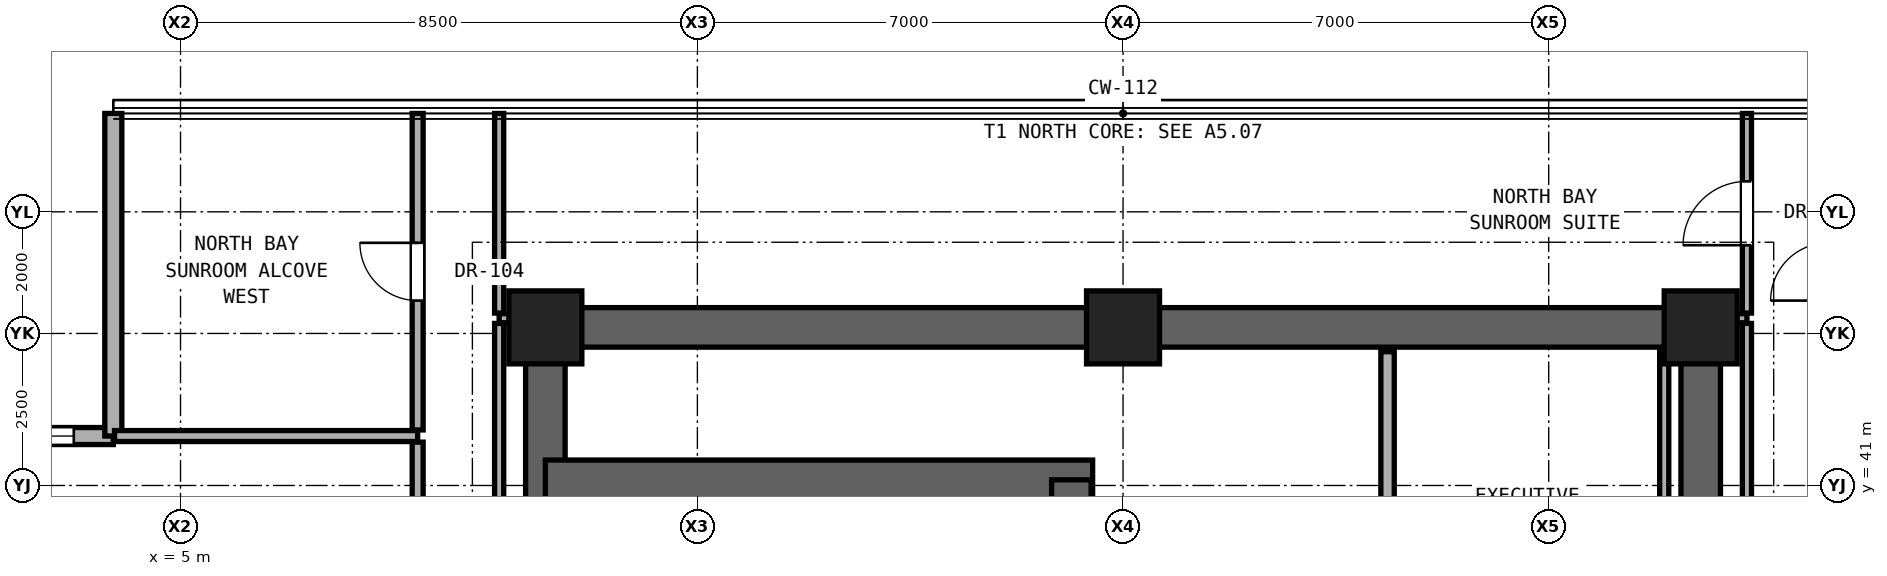
"""IFC4 building model, lengths in metres.
Left out: names, types, materials, properties, quantities, classifications, styles, units other than length and angle.
Written with IfcOpenShell. Run it as: python <this file> out.ifc"""

import sys

from ifc_helpers import new_model, si_unit, direction, frame, frame_2d, origin, origin_2d, place, context, subcontext, project, spatial, rectangle, extrude, element, fill, save


model = new_model("IFC4")
c1 = context("Model", 3, precision=1e-05, world=origin(), true_north=direction((0.0, 1.0)))
c2 = subcontext(c1, "Body", "Model", "MODEL_VIEW")
j1 = project(units=[si_unit("LENGTHUNIT", "METRE"), si_unit("PLANEANGLEUNIT", "RADIAN")], contexts=[c1])
p1 = place(None, origin())
s1 = spatial("IfcSite", under=j1, at=p1, CompositionType="ELEMENT")
p2 = place(p1, origin())
s2 = spatial("IfcBuilding", under=s1, at=p2, CompositionType="ELEMENT")
p3 = place(p2, frame((0.0, 0.0, 108.2)))
s3 = spatial("IfcBuildingStorey", under=s2, at=p3, CompositionType="ELEMENT", Elevation=108.2)
for number, where, z_axis, x_axis in (
    (1, (11.0, 43.6, 0.0), (0.0, 0.0, 1.0), (1.0, 0.0, 0.0)),
    (2, (20.5, 43.6, 0.0), (0.0, 0.0, 1.0), (1.0, 0.0, 0.0)),
    (3, (30.0, 43.6, 0.0), (0.0, 0.0, 1.0), (1.0, 0.0, 0.0)),
):
    element("IfcColumn", number, at=place(p3, frame(where, z_axis=z_axis, x_axis=x_axis)), inside=s3, PredefinedType="COLUMN", context=c2, shape_type="SweptSolid", body=[
        extrude(rectangle(XDim=1.2, YDim=1.2, at=origin_2d()), origin(), (0.0, 0.0, 1.0), 3.3),
    ])
p4 = place(p3, frame((11.0, 43.6, 0.0), z_axis=(0.0, 0.0, 1.0), x_axis=(1.0, 0.0, 0.0)))
e4 = element("IfcWall", 4, at=p4, inside=s3, PredefinedType="SHEAR", context=c2, shape_type="SweptSolid", body=[
    extrude(rectangle(XDim=19.0, YDim=0.65, at=frame_2d((9.5, 0.0))), origin(), (0.0, 0.0, 1.0), 3.08),
])
for number, where, z_axis, x_axis in (
    (5, (11.0, 37.6, 0.0), (0.0, 0.0, 1.0), (0.0, 1.0, 0.0)),
    (6, (30.0, 37.6, 0.0), (0.0, 0.0, 1.0), (0.0, 1.0, 0.0)),
):
    element("IfcWall", number, at=place(p3, frame(where, z_axis=z_axis, x_axis=x_axis)), inside=s3, PredefinedType="SHEAR", context=c2, shape_type="SweptSolid", body=[
        extrude(rectangle(XDim=6.0, YDim=0.65, at=frame_2d((3.0, 0.0))), origin(), (0.0, 0.0, 1.0), 3.08),
    ])
p5 = place(p3, frame((11.0, 41.093, 0.0), z_axis=(0.0, 0.0, 1.0), x_axis=(1.0, 0.0, 0.0)))
e7 = element("IfcWall", 7, at=p5, inside=s3, PredefinedType="SHEAR", context=c2, shape_type="SweptSolid", body=[
    extrude(rectangle(XDim=9.0, YDim=0.65, at=frame_2d((4.5, 0.0))), origin(), (0.0, 0.0, 1.0), 3.08),
])
p6 = place(p3, frame((19.65, 37.6, 0.0), z_axis=(0.0, 0.0, 1.0), x_axis=(0.0, 1.0, 0.0)))
e8 = element("IfcWall", 8, at=p6, inside=s3, PredefinedType="SHEAR", context=c2, shape_type="SweptSolid", body=[
    extrude(rectangle(XDim=3.493, YDim=0.65, at=frame_2d((1.747, 0.0))), origin(), (0.0, 0.0, 1.0), 3.08),
])
p7 = place(p3, frame((3.895, 41.813, 0.0), z_axis=(0.0, 0.0, 1.0), x_axis=(-1.0, 0.0, 0.0)))
e9 = element("IfcWall", 9, at=p7, inside=s3, PredefinedType="SOLIDWALL", context=c2, shape_type="SweptSolid", body=[
    extrude(rectangle(XDim=5.305, YDim=0.28, at=frame_2d((2.652, 0.0))), origin(), (0.0, 0.0, 1.0), 3.06),
])
p8 = place(p7, frame((0.65, 0.0, 0.85)))
e10 = element("IfcOpeningElement", 10, at=p8, cuts=e9, PredefinedType="OPENING", context=c2, shape_type="SweptSolid", body=[
    extrude(rectangle(XDim=1.1, YDim=2.0, at=frame_2d((0.55, 1.0))), frame((0.0, 0.15, 0.0), z_axis=(0.0, -1.0, 0.0), x_axis=(1.0, 0.0, 0.0)), (0.0, 0.0, 1.0), 0.3),
])
p9 = place(p3, frame((3.895, 47.118, 0.0), z_axis=(0.0, 0.0, 1.0), x_axis=(0.0, -1.0, 0.0)))
e11 = element("IfcWall", 11, at=p9, inside=s3, PredefinedType="SOLIDWALL", context=c2, shape_type="SweptSolid", body=[
    extrude(rectangle(XDim=5.305, YDim=0.28, at=frame_2d((2.652, 0.0))), origin(), (0.0, 0.0, 1.0), 3.06),
])
p10 = place(p3, frame((3.915, 41.813, 0.0), z_axis=(0.0, 0.0, 1.0), x_axis=(1.0, 0.0, 0.0)))
e12 = element("IfcWall", 12, at=p10, inside=s3, PredefinedType="PARTITIONING", context=c2, shape_type="SweptSolid", body=[
    extrude(rectangle(XDim=4.985, YDim=0.18, at=frame_2d((2.492, 0.0))), origin(), (0.0, 0.0, 1.0), 3.08),
])
for number, where, z_axis, x_axis in (
    (13, (10.24, 43.75, 0.0), (0.0, 0.0, 1.0), (1.0, 0.0, 0.0)),
    (14, (30.32, 43.75, 0.0), (0.0, 0.0, 1.0), (1.0, 0.0, 0.0)),
):
    element("IfcWall", number, at=place(p3, frame(where, z_axis=z_axis, x_axis=x_axis)), inside=s3, PredefinedType="PARTITIONING", context=c2, shape_type="SweptSolid", body=[
        extrude(rectangle(XDim=0.44, YDim=0.15, at=frame_2d((0.22, 0.0))), origin(), (0.0, 0.0, 1.0), 3.08),
    ])
p11 = place(p3, frame((8.9, 34.652, 0.0), z_axis=(0.0, 0.0, 1.0), x_axis=(0.0, 1.0, 0.0)))
e15 = element("IfcWall", 15, at=p11, inside=s3, PredefinedType="PARTITIONING", context=c2, shape_type="SweptSolid", body=[
    extrude(rectangle(XDim=7.061, YDim=0.18, at=frame_2d((3.53, 0.0))), origin(), (0.0, 0.0, 1.0), 2.456),
])
p12 = place(p11, frame((3.006, 0.0, 0.0)))
e16 = element("IfcOpeningElement", 16, at=p12, cuts=e15, PredefinedType="OPENING", context=c2, shape_type="SweptSolid", body=[
    extrude(rectangle(XDim=1.05, YDim=2.2, at=frame_2d((0.525, 1.1))), frame((0.0, 0.1, 0.0), z_axis=(0.0, -1.0, 0.0), x_axis=(1.0, 0.0, 0.0)), (0.0, 0.0, 1.0), 0.2),
])
p13 = place(p3, frame((8.9, 41.913, 0.0), z_axis=(0.0, 0.0, 1.0), x_axis=(0.0, 1.0, 0.0)))
e17 = element("IfcWall", 17, at=p13, inside=s3, PredefinedType="PARTITIONING", context=c2, shape_type="SweptSolid", body=[
    extrude(rectangle(XDim=5.205, YDim=0.18, at=frame_2d((2.603, 0.0))), origin(), (0.0, 0.0, 1.0), 3.08),
])
p14 = place(p13, frame((2.127, 0.0, 0.0)))
e18 = element("IfcOpeningElement", 18, at=p14, cuts=e17, PredefinedType="OPENING", context=c2, shape_type="SweptSolid", body=[
    extrude(rectangle(XDim=0.95, YDim=2.15, at=frame_2d((0.475, 1.075))), frame((0.0, 0.1, 0.0), z_axis=(0.0, -1.0, 0.0), x_axis=(1.0, 0.0, 0.0)), (0.0, 0.0, 1.0), 0.2),
])
p15 = place(p3, frame((10.24, 34.535, 0.0), z_axis=(0.0, 0.0, 1.0), x_axis=(0.0, 1.0, 0.0)))
e19 = element("IfcWall", 19, at=p15, inside=s3, PredefinedType="PARTITIONING", context=c2, shape_type="SweptSolid", body=[
    extrude(rectangle(XDim=9.13, YDim=0.15, at=frame_2d((4.565, 0.0))), origin(), (0.0, 0.0, 1.0), 2.456),
])
p16 = place(p3, frame((10.24, 43.835, 0.0), z_axis=(0.0, 0.0, 1.0), x_axis=(0.0, 1.0, 0.0)))
e20 = element("IfcWall", 20, at=p16, inside=s3, PredefinedType="PARTITIONING", context=c2, shape_type="SweptSolid", body=[
    extrude(rectangle(XDim=3.283, YDim=0.15, at=frame_2d((1.642, 0.0))), origin(), (0.0, 0.0, 1.0), 3.08),
])
p17 = place(p3, frame((24.85, 40.26, 0.0), z_axis=(0.0, 0.0, 1.0), x_axis=(0.0, 1.0, 0.0)))
e21 = element("IfcWall", 21, at=p17, inside=s3, PredefinedType="SOLIDWALL", context=c2, shape_type="SweptSolid", body=[
    extrude(rectangle(XDim=2.94, YDim=0.22, at=frame_2d((1.47, 0.0))), origin(), (0.0, 0.0, 1.0), 3.08),
])
p18 = place(p3, frame((29.4, 37.92, 0.0), z_axis=(0.0, 0.0, 1.0), x_axis=(0.0, 1.0, 0.0)))
e22 = element("IfcWall", 22, at=p18, inside=s3, PredefinedType="PARTITIONING", context=c2, shape_type="SweptSolid", body=[
    extrude(rectangle(XDim=5.28, YDim=0.15, at=frame_2d((2.64, 0.0))), origin(), (0.0, 0.0, 1.0), 3.08),
])
p19 = place(p3, frame((30.76, 34.57, 0.0), z_axis=(0.0, 0.0, 1.0), x_axis=(0.0, 1.0, 0.0)))
e23 = element("IfcWall", 23, at=p19, inside=s3, PredefinedType="PARTITIONING", context=c2, shape_type="SweptSolid", body=[
    extrude(rectangle(XDim=9.095, YDim=0.15, at=frame_2d((4.547, 0.0))), origin(), (0.0, 0.0, 1.0), 2.456),
])
p20 = place(p3, frame((30.76, 43.835, 0.0), z_axis=(0.0, 0.0, 1.0), x_axis=(0.0, 1.0, 0.0)))
e24 = element("IfcWall", 24, at=p20, inside=s3, PredefinedType="PARTITIONING", context=c2, shape_type="SweptSolid", body=[
    extrude(rectangle(XDim=3.283, YDim=0.15, at=frame_2d((1.642, 0.0))), origin(), (0.0, 0.0, 1.0), 3.08),
])
p21 = place(p20, frame((1.116, 0.0, 0.0)))
e25 = element("IfcOpeningElement", 25, at=p21, cuts=e24, PredefinedType="OPENING", context=c2, shape_type="SweptSolid", body=[
    extrude(rectangle(XDim=1.05, YDim=2.2, at=frame_2d((0.525, 1.1))), frame((0.0, 0.085, 0.0), z_axis=(0.0, -1.0, 0.0), x_axis=(1.0, 0.0, 0.0)), (0.0, 0.0, 1.0), 0.17),
])
p22 = place(p8, origin())
e26 = element("IfcWindow", 26, at=p22, inside=s3, PartitioningType="SINGLE_PANEL", PredefinedType="WINDOW", context=c2, shape_type="SweptSolid", body=[
    extrude(rectangle(XDim=1.1, YDim=2.0, at=frame_2d((0.55, 1.0))), frame((0.0, 0.03, 0.0), z_axis=(0.0, -1.0, 0.0), x_axis=(1.0, 0.0, 0.0)), (0.0, 0.0, 1.0), 0.06),
])
fill(e10, e26)
p23 = place(p21, origin())
e27 = element("IfcDoor", 27, at=p23, inside=s3, OperationType="SINGLE_SWING_LEFT", PredefinedType="DOOR", context=c2, shape_type="SweptSolid", body=[
    extrude(rectangle(XDim=1.05, YDim=2.2, at=frame_2d((0.525, 1.1))), frame((0.0, 0.025, 0.0), z_axis=(0.0, -1.0, 0.0), x_axis=(1.0, 0.0, 0.0)), (0.0, 0.0, 1.0), 0.05),
])
fill(e25, e27)
p24 = place(p14, origin())
e28 = element("IfcDoor", 28, at=p24, inside=s3, OperationType="SINGLE_SWING_RIGHT", PredefinedType="DOOR", context=c2, shape_type="SweptSolid", body=[
    extrude(rectangle(XDim=0.95, YDim=2.15, at=frame_2d((0.475, 1.075))), frame((0.0, 0.025, 0.0), z_axis=(0.0, -1.0, 0.0), x_axis=(1.0, 0.0, 0.0)), (0.0, 0.0, 1.0), 0.05),
])
fill(e18, e28)
save(model, sys.argv[1])
